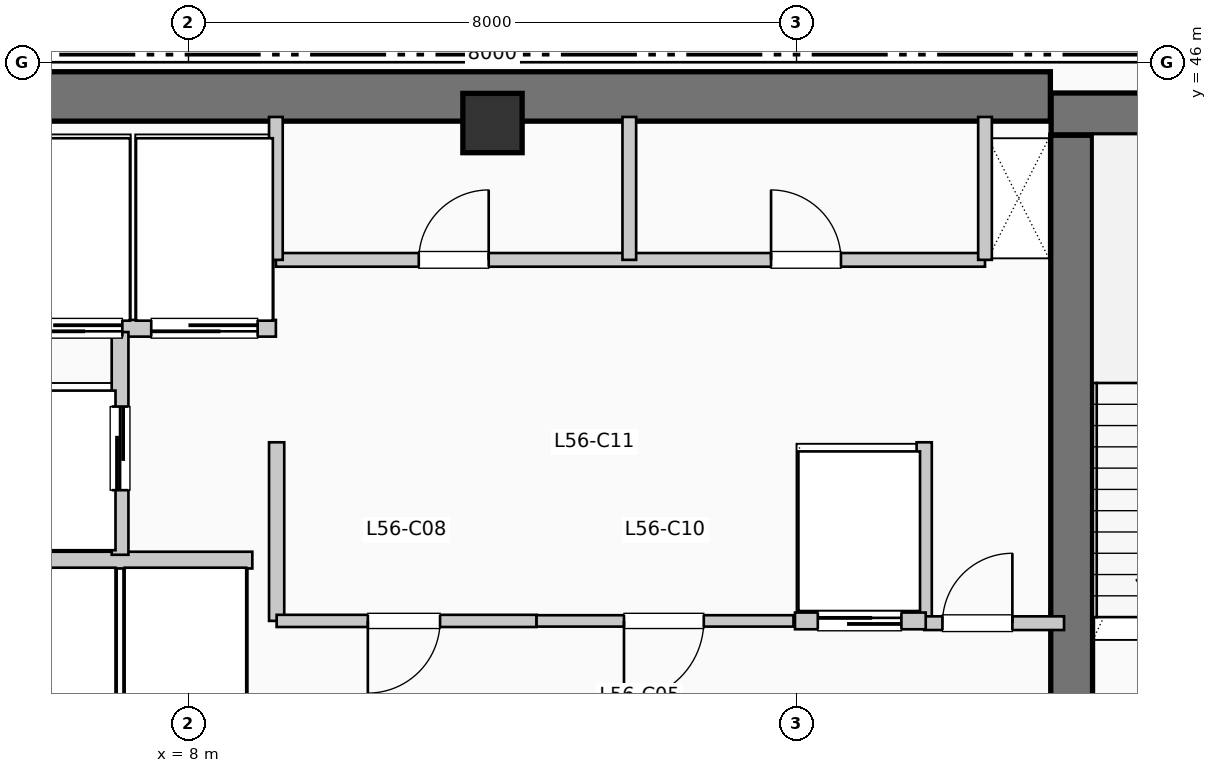
"""IFC4 building model, lengths in metres.
Left out: names, types, materials, properties, quantities, classifications, styles, units other than length and angle.
Written with IfcOpenShell. Run it as: python <this file> out.ifc"""

import sys

from ifc_helpers import new_model, si_unit, direction, frame, frame_2d, origin, origin_2d, place, context, subcontext, project, spatial, rectangle, extrude, element, fill, save


model = new_model("IFC4")
c1 = context("Model", 3, precision=1e-05, world=origin(), true_north=direction((0.0, 1.0)))
c2 = subcontext(c1, "Body", "Model", "MODEL_VIEW")
j1 = project(units=[si_unit("LENGTHUNIT", "METRE"), si_unit("PLANEANGLEUNIT", "RADIAN")], contexts=[c1])
p1 = place(None, origin())
s1 = spatial("IfcSite", under=j1, at=p1, CompositionType="ELEMENT")
p2 = place(p1, origin())
s2 = spatial("IfcBuilding", under=s1, at=p2, CompositionType="ELEMENT")
p3 = place(p2, frame((0.0, 0.0, 231.66)))
s3 = spatial("IfcBuildingStorey", under=s2, at=p3, CompositionType="ELEMENT", Elevation=231.66)
p4 = place(p3, frame((5.36, 45.55, 0.0), z_axis=(0.0, 0.0, 1.0), x_axis=(1.0, 0.0, 0.0)))
e1 = element("IfcWall", 1, at=p4, inside=s3, PredefinedType="SHEAR", context=c2, shape_type="SweptSolid", body=[
    extrude(rectangle(XDim=13.98, YDim=0.65, at=frame_2d((6.99, 0.0))), origin(), (0.0, 0.0, 1.0), 3.96),
])
p5 = place(p3, frame((19.62, 37.15, 0.0), z_axis=(0.0, 0.0, 1.0), x_axis=(0.0, 1.0, 0.0)))
e2 = element("IfcWall", 2, at=p5, inside=s3, PredefinedType="SHEAR", context=c2, shape_type="SweptSolid", body=[
    extrude(rectangle(XDim=7.89, YDim=0.55, at=frame_2d((3.945, 0.0))), origin(), (0.0, 0.0, 1.0), 3.96),
])
p6 = place(p3, frame((19.35, 45.32, 0.0), z_axis=(0.0, 0.0, 1.0), x_axis=(1.0, 0.0, 0.0)))
e3 = element("IfcWall", 3, at=p6, inside=s3, PredefinedType="SHEAR", context=c2, shape_type="SweptSolid", body=[
    extrude(rectangle(XDim=3.69, YDim=0.55, at=frame_2d((1.845, 0.0))), origin(), (0.0, 0.0, 1.0), 3.96),
])
p7 = place(p6, frame((1.15, 0.0, 1.05)))
e4 = element("IfcOpeningElement", 4, at=p7, cuts=e3, PredefinedType="OPENING", context=c2, shape_type="SweptSolid", body=[
    extrude(rectangle(XDim=1.4, YDim=1.8, at=frame_2d((0.7, 0.9))), frame((0.0, 0.285, 0.0), z_axis=(0.0, -1.0, 0.0), x_axis=(1.0, 0.0, 0.0)), (0.0, 0.0, 1.0), 0.57),
])
p8 = place(p3, frame((12.0, 45.2, 0.0), z_axis=(0.0, 0.0, 1.0), x_axis=(1.0, 0.0, 0.0)))
e5 = element("IfcColumn", 5, at=p8, inside=s3, PredefinedType="COLUMN", context=c2, shape_type="SweptSolid", body=[
    extrude(rectangle(XDim=0.78, YDim=0.78, at=origin_2d()), origin(), (0.0, 0.0, 1.0), 3.96),
])
p9 = place(p3, frame((5.38, 39.45, 0.0), z_axis=(0.0, 0.0, 1.0), x_axis=(1.0, 0.0, 0.0)))
e6 = element("IfcWall", 6, at=p9, inside=s3, PredefinedType="PARTITIONING", context=c2, shape_type="SweptSolid", body=[
    extrude(rectangle(XDim=3.46, YDim=0.22, at=frame_2d((1.73, 0.0))), origin(), (0.0, 0.0, 1.0), 3.71),
])
p10 = place(p3, frame((5.38, 42.5, 0.0), z_axis=(0.0, 0.0, 1.0), x_axis=(1.0, 0.0, 0.0)))
e7 = element("IfcWall", 7, at=p10, inside=s3, PredefinedType="PARTITIONING", context=c2, shape_type="SweptSolid", body=[
    extrude(rectangle(XDim=3.77, YDim=0.22, at=frame_2d((1.885, 0.0))), origin(), (0.0, 0.0, 1.0), 3.71),
])
p11 = place(p10, frame((1.75, 0.0, 0.0), z_axis=(0.0, 0.0, 1.0), x_axis=(-1.0, 0.0, 0.0)))
e8 = element("IfcOpeningElement", 8, at=p11, cuts=e7, PredefinedType="OPENING", context=c2, shape_type="SweptSolid", body=[
    extrude(rectangle(XDim=1.4, YDim=2.2, at=frame_2d((0.7, 1.1))), frame((0.0, 0.12, 0.0), z_axis=(0.0, -1.0, 0.0), x_axis=(1.0, 0.0, 0.0)), (0.0, 0.0, 1.0), 0.24),
])
p12 = place(p10, frame((3.53, 0.0, 0.0), z_axis=(0.0, 0.0, 1.0), x_axis=(-1.0, 0.0, 0.0)))
e9 = element("IfcOpeningElement", 9, at=p12, cuts=e7, PredefinedType="OPENING", context=c2, shape_type="SweptSolid", body=[
    extrude(rectangle(XDim=1.4, YDim=2.2, at=frame_2d((0.7, 1.1))), frame((0.0, 0.12, 0.0), z_axis=(0.0, -1.0, 0.0), x_axis=(1.0, 0.0, 0.0)), (0.0, 0.0, 1.0), 0.24),
])
p13 = place(p3, frame((7.1, 39.52, 0.0), z_axis=(0.0, 0.0, 1.0), x_axis=(0.0, 1.0, 0.0)))
e10 = element("IfcWall", 10, at=p13, inside=s3, PredefinedType="PARTITIONING", context=c2, shape_type="SweptSolid", body=[
    extrude(rectangle(XDim=2.93, YDim=0.22, at=frame_2d((1.465, 0.0))), origin(), (0.0, 0.0, 1.0), 3.71),
])
p14 = place(p13, frame((0.85, 0.0, 0.0)))
e11 = element("IfcOpeningElement", 11, at=p14, cuts=e10, PredefinedType="OPENING", context=c2, shape_type="SweptSolid", body=[
    extrude(rectangle(XDim=1.1, YDim=2.2, at=frame_2d((0.55, 1.1))), frame((0.0, 0.12, 0.0), z_axis=(0.0, -1.0, 0.0), x_axis=(1.0, 0.0, 0.0)), (0.0, 0.0, 1.0), 0.24),
])
for number, where, z_axis, x_axis in (
    (12, (9.16, 38.65, 0.0), (0.0, 0.0, 1.0), (0.0, 1.0, 0.0)),
    (13, (17.68, 38.65, 0.0), (0.0, 0.0, 1.0), (0.0, 1.0, 0.0)),
):
    element("IfcWall", number, at=place(p3, frame(where, z_axis=z_axis, x_axis=x_axis)), inside=s3, PredefinedType="PARTITIONING", context=c2, shape_type="SweptSolid", body=[
        extrude(rectangle(XDim=2.35, YDim=0.2, at=frame_2d((1.175, 0.0))), origin(), (0.0, 0.0, 1.0), 3.71),
    ])
p15 = place(p3, frame((17.68, 38.62, 0.0), z_axis=(0.0, 0.0, 1.0), x_axis=(1.0, 0.0, 0.0)))
e14 = element("IfcWall", 14, at=p15, inside=s3, PredefinedType="PARTITIONING", context=c2, shape_type="SweptSolid", body=[
    extrude(rectangle(XDim=1.84, YDim=0.18, at=frame_2d((0.92, 0.0))), origin(), (0.0, 0.0, 1.0), 3.71),
])
p16 = place(p15, frame((0.24, 0.0, 0.0)))
e15 = element("IfcOpeningElement", 15, at=p16, cuts=e14, PredefinedType="OPENING", context=c2, shape_type="SweptSolid", body=[
    extrude(rectangle(XDim=0.92, YDim=2.1, at=frame_2d((0.46, 1.05))), frame((0.0, 0.1, 0.0), z_axis=(0.0, -1.0, 0.0), x_axis=(1.0, 0.0, 0.0)), (0.0, 0.0, 1.0), 0.2),
])
p17 = place(p3, frame((9.16, 38.65, 0.0), z_axis=(0.0, 0.0, 1.0), x_axis=(1.0, 0.0, 0.0)))
e16 = element("IfcWall", 16, at=p17, inside=s3, PredefinedType="PARTITIONING", context=c2, shape_type="SweptSolid", body=[
    extrude(rectangle(XDim=3.42, YDim=0.16, at=frame_2d((1.71, 0.0))), origin(), (0.0, 0.0, 1.0), 3.71),
])
p18 = place(p17, frame((2.15, 0.0, 0.0), z_axis=(0.0, 0.0, 1.0), x_axis=(-1.0, 0.0, 0.0)))
e17 = element("IfcOpeningElement", 17, at=p18, cuts=e16, PredefinedType="OPENING", context=c2, shape_type="SweptSolid", body=[
    extrude(rectangle(XDim=0.95, YDim=2.15, at=frame_2d((0.475, 1.075))), frame((0.0, 0.09, 0.0), z_axis=(0.0, -1.0, 0.0), x_axis=(1.0, 0.0, 0.0)), (0.0, 0.0, 1.0), 0.18),
])
p19 = place(p3, frame((12.58, 38.65, 0.0), z_axis=(0.0, 0.0, 1.0), x_axis=(1.0, 0.0, 0.0)))
e18 = element("IfcWall", 18, at=p19, inside=s3, PredefinedType="PARTITIONING", context=c2, shape_type="SweptSolid", body=[
    extrude(rectangle(XDim=3.38, YDim=0.15, at=frame_2d((1.69, 0.0))), origin(), (0.0, 0.0, 1.0), 3.71),
])
p20 = place(p19, frame((2.2, 0.0, 0.0), z_axis=(0.0, 0.0, 1.0), x_axis=(-1.0, 0.0, 0.0)))
e19 = element("IfcOpeningElement", 19, at=p20, cuts=e18, PredefinedType="OPENING", context=c2, shape_type="SweptSolid", body=[
    extrude(rectangle(XDim=1.05, YDim=2.15, at=frame_2d((0.525, 1.075))), frame((0.0, 0.085, 0.0), z_axis=(0.0, -1.0, 0.0), x_axis=(1.0, 0.0, 0.0)), (0.0, 0.0, 1.0), 0.17),
])
p21 = place(p3, frame((15.98, 38.65, 0.0), z_axis=(0.0, 0.0, 1.0), x_axis=(1.0, 0.0, 0.0)))
e20 = element("IfcWall", 20, at=p21, inside=s3, PredefinedType="PARTITIONING", context=c2, shape_type="SweptSolid", body=[
    extrude(rectangle(XDim=1.72, YDim=0.22, at=frame_2d((0.86, 0.0))), origin(), (0.0, 0.0, 1.0), 3.71),
])
p22 = place(p21, frame((0.3, 0.0, 0.0)))
e21 = element("IfcOpeningElement", 21, at=p22, cuts=e20, PredefinedType="OPENING", context=c2, shape_type="SweptSolid", body=[
    extrude(rectangle(XDim=1.1, YDim=2.2, at=frame_2d((0.55, 1.1))), frame((0.0, 0.12, 0.0), z_axis=(0.0, -1.0, 0.0), x_axis=(1.0, 0.0, 0.0)), (0.0, 0.0, 1.0), 0.24),
])
p23 = place(p3, frame((9.15, 43.4, 0.0), z_axis=(0.0, 0.0, 1.0), x_axis=(1.0, 0.0, 0.0)))
e22 = element("IfcWall", 22, at=p23, inside=s3, PredefinedType="PLUMBINGWALL", context=c2, shape_type="SweptSolid", body=[
    extrude(rectangle(XDim=9.33, YDim=0.18, at=frame_2d((4.665, 0.0))), origin(), (0.0, 0.0, 1.0), 3.71),
])
p24 = place(p23, frame((1.88, 0.0, 0.0)))
e23 = element("IfcOpeningElement", 23, at=p24, cuts=e22, PredefinedType="OPENING", context=c2, shape_type="SweptSolid", body=[
    extrude(rectangle(XDim=0.92, YDim=2.1, at=frame_2d((0.46, 1.05))), frame((0.0, 0.1, 0.0), z_axis=(0.0, -1.0, 0.0), x_axis=(1.0, 0.0, 0.0)), (0.0, 0.0, 1.0), 0.2),
])
p25 = place(p23, frame((6.515, 0.0, 0.0)))
e24 = element("IfcOpeningElement", 24, at=p25, cuts=e22, PredefinedType="OPENING", context=c2, shape_type="SweptSolid", body=[
    extrude(rectangle(XDim=0.92, YDim=2.1, at=frame_2d((0.46, 1.05))), frame((0.0, 0.1, 0.0), z_axis=(0.0, -1.0, 0.0), x_axis=(1.0, 0.0, 0.0)), (0.0, 0.0, 1.0), 0.2),
])
for number, where, z_axis, x_axis in (
    (25, (9.15, 43.4, 0.0), (0.0, 0.0, 1.0), (0.0, 1.0, 0.0)),
    (26, (18.48, 43.4, 0.0), (0.0, 0.0, 1.0), (0.0, 1.0, 0.0)),
    (27, (13.8, 43.4, 0.0), (0.0, 0.0, 1.0), (0.0, 1.0, 0.0)),
):
    element("IfcWall", number, at=place(p3, frame(where, z_axis=z_axis, x_axis=x_axis)), inside=s3, PredefinedType="PLUMBINGWALL", context=c2, shape_type="SweptSolid", body=[
        extrude(rectangle(XDim=1.88, YDim=0.18, at=frame_2d((0.94, 0.0))), origin(), (0.0, 0.0, 1.0), 3.71),
    ])
p26 = place(p11, origin())
e28 = element("IfcDoor", 28, at=p26, inside=s3, OperationType="SLIDING_TO_LEFT", PredefinedType="DOOR", context=c2, shape_type="SweptSolid", body=[
    extrude(rectangle(XDim=1.4, YDim=2.2, at=frame_2d((0.7, 1.1))), frame((0.0, 0.025, 0.0), z_axis=(0.0, -1.0, 0.0), x_axis=(1.0, 0.0, 0.0)), (0.0, 0.0, 1.0), 0.05),
])
fill(e8, e28)
p27 = place(p12, origin())
e29 = element("IfcDoor", 29, at=p27, inside=s3, OperationType="SLIDING_TO_LEFT", PredefinedType="DOOR", context=c2, shape_type="SweptSolid", body=[
    extrude(rectangle(XDim=1.4, YDim=2.2, at=frame_2d((0.7, 1.1))), frame((0.0, 0.025, 0.0), z_axis=(0.0, -1.0, 0.0), x_axis=(1.0, 0.0, 0.0)), (0.0, 0.0, 1.0), 0.05),
])
fill(e9, e29)
p28 = place(p14, origin())
e30 = element("IfcDoor", 30, at=p28, inside=s3, OperationType="SLIDING_TO_LEFT", PredefinedType="DOOR", context=c2, shape_type="SweptSolid", body=[
    extrude(rectangle(XDim=1.1, YDim=2.2, at=frame_2d((0.55, 1.1))), frame((0.0, 0.025, 0.0), z_axis=(0.0, -1.0, 0.0), x_axis=(1.0, 0.0, 0.0)), (0.0, 0.0, 1.0), 0.05),
])
fill(e11, e30)
p29 = place(p16, origin())
e31 = element("IfcDoor", 31, at=p29, inside=s3, OperationType="SINGLE_SWING_RIGHT", PredefinedType="DOOR", context=c2, shape_type="SweptSolid", body=[
    extrude(rectangle(XDim=0.92, YDim=2.1, at=frame_2d((0.46, 1.05))), frame((0.0, 0.025, 0.0), z_axis=(0.0, -1.0, 0.0), x_axis=(1.0, 0.0, 0.0)), (0.0, 0.0, 1.0), 0.05),
])
fill(e15, e31)
p30 = place(p18, origin())
e32 = element("IfcDoor", 32, at=p30, inside=s3, OperationType="SINGLE_SWING_LEFT", PredefinedType="DOOR", context=c2, shape_type="SweptSolid", body=[
    extrude(rectangle(XDim=0.95, YDim=2.15, at=frame_2d((0.475, 1.075))), frame((0.0, 0.025, 0.0), z_axis=(0.0, -1.0, 0.0), x_axis=(1.0, 0.0, 0.0)), (0.0, 0.0, 1.0), 0.05),
])
fill(e17, e32)
p31 = place(p20, origin())
e33 = element("IfcDoor", 33, at=p31, inside=s3, OperationType="SINGLE_SWING_LEFT", PredefinedType="DOOR", context=c2, shape_type="SweptSolid", body=[
    extrude(rectangle(XDim=1.05, YDim=2.15, at=frame_2d((0.525, 1.075))), frame((0.0, 0.025, 0.0), z_axis=(0.0, -1.0, 0.0), x_axis=(1.0, 0.0, 0.0)), (0.0, 0.0, 1.0), 0.05),
])
fill(e19, e33)
p32 = place(p22, origin())
e34 = element("IfcDoor", 34, at=p32, inside=s3, OperationType="SLIDING_TO_LEFT", PredefinedType="DOOR", context=c2, shape_type="SweptSolid", body=[
    extrude(rectangle(XDim=1.1, YDim=2.2, at=frame_2d((0.55, 1.1))), frame((0.0, 0.025, 0.0), z_axis=(0.0, -1.0, 0.0), x_axis=(1.0, 0.0, 0.0)), (0.0, 0.0, 1.0), 0.05),
])
fill(e21, e34)
p33 = place(p24, origin())
e35 = element("IfcDoor", 35, at=p33, inside=s3, OperationType="SINGLE_SWING_RIGHT", PredefinedType="DOOR", context=c2, shape_type="SweptSolid", body=[
    extrude(rectangle(XDim=0.92, YDim=2.1, at=frame_2d((0.46, 1.05))), frame((0.0, 0.025, 0.0), z_axis=(0.0, -1.0, 0.0), x_axis=(1.0, 0.0, 0.0)), (0.0, 0.0, 1.0), 0.05),
])
fill(e23, e35)
p34 = place(p25, origin())
e36 = element("IfcDoor", 36, at=p34, inside=s3, OperationType="SINGLE_SWING_LEFT", PredefinedType="DOOR", context=c2, shape_type="SweptSolid", body=[
    extrude(rectangle(XDim=0.92, YDim=2.1, at=frame_2d((0.46, 1.05))), frame((0.0, 0.025, 0.0), z_axis=(0.0, -1.0, 0.0), x_axis=(1.0, 0.0, 0.0)), (0.0, 0.0, 1.0), 0.05),
])
fill(e24, e36)
save(model, sys.argv[1])
